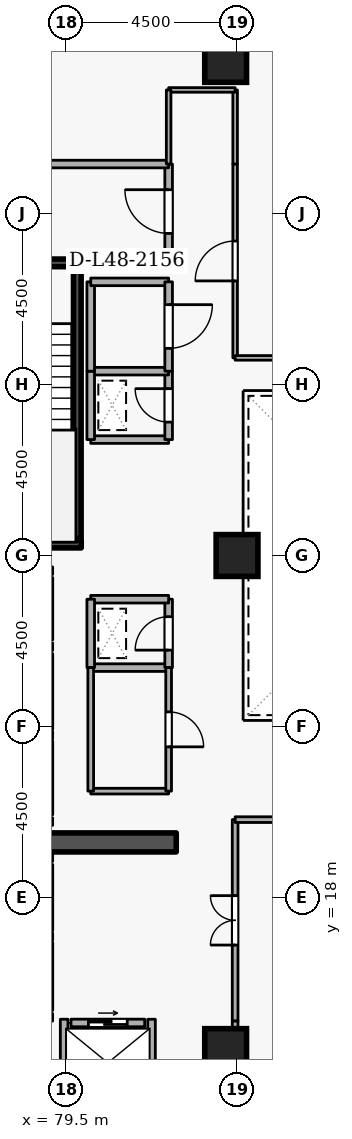
"""IFC4 building model, lengths in metres.
Left out: names, types, materials, properties, quantities, classifications, styles, units other than length and angle.
Written with IfcOpenShell. Run it as: python <this file> out.ifc"""

import sys

from ifc_helpers import new_model, si_unit, direction, frame, frame_2d, origin, origin_2d, place, context, subcontext, project, spatial, rectangle, extrude, element, fill, save


model = new_model("IFC4")
c1 = context("Model", 3, precision=1e-05, world=origin(), true_north=direction((0.0, 1.0)))
c2 = subcontext(c1, "Body", "Model", "MODEL_VIEW")
j1 = project(units=[si_unit("LENGTHUNIT", "METRE"), si_unit("PLANEANGLEUNIT", "RADIAN")], contexts=[c1])
p1 = place(None, origin())
s1 = spatial("IfcSite", under=j1, at=p1, CompositionType="ELEMENT")
p2 = place(p1, origin())
s2 = spatial("IfcBuilding", under=s1, at=p2, CompositionType="ELEMENT")
p3 = place(p2, frame((0.0, 0.0, 182.1)))
s3 = spatial("IfcBuildingStorey", under=s2, at=p3, CompositionType="ELEMENT", Elevation=182.1)
p4 = place(p3, frame((76.6, 19.45, 0.0), z_axis=(0.0, 0.0, 1.0), x_axis=(1.0, 0.0, 0.0)))
e1 = element("IfcWall", 1, at=p4, inside=s3, PredefinedType="SHEAR", context=c2, shape_type="SweptSolid", body=[
    extrude(rectangle(XDim=5.8, YDim=0.5, at=frame_2d((2.9, 0.0))), origin(), (0.0, 0.0, 1.0), 3.6),
])
for number, where, z_axis, x_axis in (
    (2, (83.7, 14.0, 0.0), (0.0, 0.0, 1.0), (1.0, 0.0, 0.0)),
    (3, (83.7, 40.0, 0.0), (0.0, 0.0, 1.0), (1.0, 0.0, 0.0)),
    (4, (84.0, 27.0, 0.0), (0.0, 0.0, 1.0), (1.0, 0.0, 0.0)),
):
    element("IfcColumn", number, at=place(p3, frame(where, z_axis=z_axis, x_axis=x_axis)), inside=s3, PredefinedType="COLUMN", context=c2, shape_type="SweptSolid", body=[
        extrude(rectangle(XDim=1.1, YDim=1.1, at=origin_2d()), origin(), (0.0, 0.0, 1.0), 3.6),
    ])
p5 = place(p3, frame((79.05, 24.78, 0.0), z_axis=(0.0, 0.0, 1.0), x_axis=(0.0, 1.0, 0.0)))
e5 = element("IfcWall", 5, at=p5, inside=s3, PredefinedType="STANDARD", context=c2, shape_type="SweptSolid", body=[
    extrude(rectangle(XDim=1.64, YDim=0.2, at=frame_2d((0.82, 0.0))), origin(), (0.0, 0.0, 1.0), 3.34),
])
p6 = place(p5, frame((0.31, 0.0, 0.0)))
e6 = element("IfcOpeningElement", 6, at=p6, cuts=e5, PredefinedType="OPENING", context=c2, shape_type="SweptSolid", body=[
    extrude(rectangle(XDim=1.02, YDim=2.06, at=frame_2d((0.51, 1.03))), frame((0.0, 0.11, 0.0), z_axis=(0.0, -1.0, 0.0), x_axis=(1.0, 0.0, 0.0)), (0.0, 0.0, 1.0), 0.22),
])
p7 = place(p3, frame((79.05, 22.43, 0.0), z_axis=(0.0, 0.0, 1.0), x_axis=(0.0, 1.0, 0.0)))
e7 = element("IfcWall", 7, at=p7, inside=s3, PredefinedType="STANDARD", context=c2, shape_type="SweptSolid", body=[
    extrude(rectangle(XDim=1.99, YDim=0.2, at=frame_2d((0.995, 0.0))), origin(), (0.0, 0.0, 1.0), 3.34),
])
p8 = place(p7, frame((0.485, 0.0, 0.0)))
e8 = element("IfcOpeningElement", 8, at=p8, cuts=e7, PredefinedType="OPENING", context=c2, shape_type="SweptSolid", body=[
    extrude(rectangle(XDim=1.02, YDim=2.06, at=frame_2d((0.51, 1.03))), frame((0.0, 0.11, 0.0), z_axis=(0.0, -1.0, 0.0), x_axis=(1.0, 0.0, 0.0)), (0.0, 0.0, 1.0), 0.22),
])
p9 = place(p3, frame((79.05, 20.18, 0.0), z_axis=(0.0, 0.0, 1.0), x_axis=(0.0, 1.0, 0.0)))
e9 = element("IfcWall", 9, at=p9, inside=s3, PredefinedType="STANDARD", context=c2, shape_type="SweptSolid", body=[
    extrude(rectangle(XDim=1.94, YDim=0.2, at=frame_2d((0.97, 0.0))), origin(), (0.0, 0.0, 1.0), 3.34),
])
p10 = place(p9, frame((0.46, 0.0, 0.0)))
e10 = element("IfcOpeningElement", 10, at=p10, cuts=e9, PredefinedType="OPENING", context=c2, shape_type="SweptSolid", body=[
    extrude(rectangle(XDim=1.02, YDim=2.06, at=frame_2d((0.51, 1.03))), frame((0.0, 0.11, 0.0), z_axis=(0.0, -1.0, 0.0), x_axis=(1.0, 0.0, 0.0)), (0.0, 0.0, 1.0), 0.22),
])
p11 = place(p3, frame((79.05, 17.13, 0.0), z_axis=(0.0, 0.0, 1.0), x_axis=(0.0, 1.0, 0.0)))
e11 = element("IfcWall", 11, at=p11, inside=s3, PredefinedType="STANDARD", context=c2, shape_type="SweptSolid", body=[
    extrude(rectangle(XDim=1.74, YDim=0.2, at=frame_2d((0.87, 0.0))), origin(), (0.0, 0.0, 1.0), 3.34),
])
p12 = place(p11, frame((0.36, 0.0, 0.0)))
e12 = element("IfcOpeningElement", 12, at=p12, cuts=e11, PredefinedType="OPENING", context=c2, shape_type="SweptSolid", body=[
    extrude(rectangle(XDim=1.02, YDim=2.06, at=frame_2d((0.51, 1.03))), frame((0.0, 0.11, 0.0), z_axis=(0.0, -1.0, 0.0), x_axis=(1.0, 0.0, 0.0)), (0.0, 0.0, 1.0), 0.22),
])
p13 = place(p3, frame((79.05, 15.03, 0.0), z_axis=(0.0, 0.0, 1.0), x_axis=(0.0, 1.0, 0.0)))
e13 = element("IfcWall", 13, at=p13, inside=s3, PredefinedType="STANDARD", context=c2, shape_type="SweptSolid", body=[
    extrude(rectangle(XDim=1.79, YDim=0.2, at=frame_2d((0.895, 0.0))), origin(), (0.0, 0.0, 1.0), 3.34),
])
p14 = place(p13, frame((0.385, 0.0, 0.0)))
e14 = element("IfcOpeningElement", 14, at=p14, cuts=e13, PredefinedType="OPENING", context=c2, shape_type="SweptSolid", body=[
    extrude(rectangle(XDim=1.02, YDim=2.06, at=frame_2d((0.51, 1.03))), frame((0.0, 0.11, 0.0), z_axis=(0.0, -1.0, 0.0), x_axis=(1.0, 0.0, 0.0)), (0.0, 0.0, 1.0), 0.22),
])
p15 = place(p3, frame((79.63, 14.7, 0.0), z_axis=(0.0, 0.0, 1.0), x_axis=(1.0, 0.0, 0.0)))
e15 = element("IfcWall", 15, at=p15, inside=s3, PredefinedType="STANDARD", context=c2, shape_type="SweptSolid", body=[
    extrude(rectangle(XDim=1.94, YDim=0.2, at=frame_2d((0.97, 0.0))), origin(), (0.0, 0.0, 1.0), 3.34),
])
p16 = place(p15, frame((0.46, 0.0, 0.0)))
e16 = element("IfcOpeningElement", 16, at=p16, cuts=e15, PredefinedType="OPENING", context=c2, shape_type="SweptSolid", body=[
    extrude(rectangle(XDim=1.02, YDim=2.06, at=frame_2d((0.51, 1.03))), frame((0.0, 0.11, 0.0), z_axis=(0.0, -1.0, 0.0), x_axis=(1.0, 0.0, 0.0)), (0.0, 0.0, 1.0), 0.22),
])
for number, where, z_axis, x_axis in (
    (17, (81.75, 12.612, 0.0), (0.0, 0.0, 1.0), (0.0, 1.0, 0.0)),
    (18, (79.45, 12.612, 0.0), (0.0, 0.0, 1.0), (0.0, 1.0, 0.0)),
):
    element("IfcWall", number, at=place(p3, frame(where, z_axis=z_axis, x_axis=x_axis)), inside=s3, PredefinedType="STANDARD", context=c2, shape_type="SweptSolid", body=[
        extrude(rectangle(XDim=2.186, YDim=0.2, at=frame_2d((1.093, 0.0))), origin(), (0.0, 0.0, 1.0), 3.34),
    ])
p17 = place(p3, frame((76.55, 34.7, 0.0), z_axis=(0.0, 0.0, 1.0), x_axis=(1.0, 0.0, 0.0)))
e19 = element("IfcWall", 19, at=p17, inside=s3, PredefinedType="SHEAR", context=c2, shape_type="SweptSolid", body=[
    extrude(rectangle(XDim=3.35, YDim=0.2, at=frame_2d((1.675, 0.0))), origin(), (0.0, 0.0, 1.0), 3.6),
])
p18 = place(p17, frame((1.125, 0.0, 0.0)))
e20 = element("IfcOpeningElement", 20, at=p18, cuts=e19, PredefinedType="OPENING", context=c2, shape_type="SweptSolid", body=[
    extrude(rectangle(XDim=1.1, YDim=2.1, at=frame_2d((0.55, 1.05))), frame((0.0, 0.11, 0.0), z_axis=(0.0, -1.0, 0.0), x_axis=(1.0, 0.0, 0.0)), (0.0, 0.0, 1.0), 0.22),
])
p19 = place(p3, frame((79.9, 27.3, 0.0), z_axis=(0.0, 0.0, 1.0), x_axis=(-1.0, 0.0, 0.0)))
e21 = element("IfcWall", 21, at=p19, inside=s3, PredefinedType="SHEAR", context=c2, shape_type="SweptSolid", body=[
    extrude(rectangle(XDim=3.35, YDim=0.2, at=frame_2d((1.675, 0.0))), origin(), (0.0, 0.0, 1.0), 3.6),
])
p20 = place(p3, frame((79.797, 27.45, 0.0), z_axis=(0.0, 0.0, 1.0), x_axis=(0.0, 1.0, 0.0)))
e22 = element("IfcWall", 22, at=p20, inside=s3, PredefinedType="SHEAR", context=c2, shape_type="SweptSolid", body=[
    extrude(rectangle(XDim=7.1, YDim=0.2, at=frame_2d((3.55, 0.0))), origin(), (0.0, 0.0, 1.0), 3.6),
])
p21 = place(p3, frame((79.9, 34.8, 0.0), z_axis=(0.0, 0.0, 1.0), x_axis=(1.0, 0.0, 0.0)))
e23 = element("IfcWall", 23, at=p21, inside=s3, PredefinedType="STANDARD", context=c2, shape_type="SweptSolid", body=[
    extrude(rectangle(XDim=2.3, YDim=0.2, at=frame_2d((1.15, 0.0))), origin(), (0.0, 0.0, 1.0), 2.545),
])
p22 = place(p3, frame((82.2, 34.8, 0.0), z_axis=(0.0, 0.0, 1.0), x_axis=(0.0, 1.0, 0.0)))
e24 = element("IfcWall", 24, at=p22, inside=s3, PredefinedType="STANDARD", context=c2, shape_type="SweptSolid", body=[
    extrude(rectangle(XDim=2.5, YDim=0.2, at=frame_2d((1.25, 0.0))), origin(), (0.0, 0.0, 1.0), 3.34),
])
p23 = place(p22, frame((0.675, 0.0, 0.0)))
e25 = element("IfcOpeningElement", 25, at=p23, cuts=e24, PredefinedType="OPENING", context=c2, shape_type="SweptSolid", body=[
    extrude(rectangle(XDim=1.15, YDim=2.1, at=frame_2d((0.575, 1.05))), frame((0.0, 0.11, 0.0), z_axis=(0.0, -1.0, 0.0), x_axis=(1.0, 0.0, 0.0)), (0.0, 0.0, 1.0), 0.22),
])
p24 = place(p3, frame((82.2, 37.3, 0.0), z_axis=(0.0, 0.0, 1.0), x_axis=(-1.0, 0.0, 0.0)))
e26 = element("IfcWall", 26, at=p24, inside=s3, PredefinedType="STANDARD", context=c2, shape_type="SweptSolid", body=[
    extrude(rectangle(XDim=5.7, YDim=0.2, at=frame_2d((2.85, 0.0))), origin(), (0.0, 0.0, 1.0), 3.34),
])
p25 = place(p3, frame((80.15, 24.05, 0.0), z_axis=(0.0, 0.0, 1.0), x_axis=(1.0, 0.0, 0.0)))
e27 = element("IfcWall", 27, at=p25, inside=s3, PredefinedType="STANDARD", context=c2, shape_type="SweptSolid", body=[
    extrude(rectangle(XDim=2.05, YDim=0.2, at=frame_2d((1.025, 0.0))), origin(), (0.0, 0.0, 1.0), 3.34),
])
p26 = place(p3, frame((82.2, 24.05, 0.0), z_axis=(0.0, 0.0, 1.0), x_axis=(0.0, 1.0, 0.0)))
e28 = element("IfcWall", 28, at=p26, inside=s3, PredefinedType="STANDARD", context=c2, shape_type="SweptSolid", body=[
    extrude(rectangle(XDim=1.8, YDim=0.2, at=frame_2d((0.9, 0.0))), origin(), (0.0, 0.0, 1.0), 3.34),
])
p27 = place(p26, frame((0.46, 0.0, 0.0)))
e29 = element("IfcOpeningElement", 29, at=p27, cuts=e28, PredefinedType="OPENING", context=c2, shape_type="SweptSolid", body=[
    extrude(rectangle(XDim=0.88, YDim=2.04, at=frame_2d((0.44, 1.02))), frame((0.0, 0.11, 0.0), z_axis=(0.0, -1.0, 0.0), x_axis=(1.0, 0.0, 0.0)), (0.0, 0.0, 1.0), 0.22),
])
p28 = place(p3, frame((82.2, 25.85, 0.0), z_axis=(0.0, 0.0, 1.0), x_axis=(-1.0, 0.0, 0.0)))
e30 = element("IfcWall", 30, at=p28, inside=s3, PredefinedType="STANDARD", context=c2, shape_type="SweptSolid", body=[
    extrude(rectangle(XDim=2.05, YDim=0.2, at=frame_2d((1.025, 0.0))), origin(), (0.0, 0.0, 1.0), 3.34),
])
p29 = place(p3, frame((80.15, 25.85, 0.0), z_axis=(0.0, 0.0, 1.0), x_axis=(0.0, -1.0, 0.0)))
e31 = element("IfcWall", 31, at=p29, inside=s3, PredefinedType="STANDARD", context=c2, shape_type="SweptSolid", body=[
    extrude(rectangle(XDim=1.8, YDim=0.2, at=frame_2d((0.9, 0.0))), origin(), (0.0, 0.0, 1.0), 3.34),
])
p30 = place(p3, frame((80.15, 30.05, 0.0), z_axis=(0.0, 0.0, 1.0), x_axis=(1.0, 0.0, 0.0)))
e32 = element("IfcWall", 32, at=p30, inside=s3, PredefinedType="STANDARD", context=c2, shape_type="SweptSolid", body=[
    extrude(rectangle(XDim=2.05, YDim=0.2, at=frame_2d((1.025, 0.0))), origin(), (0.0, 0.0, 1.0), 3.34),
])
p31 = place(p3, frame((82.2, 30.05, 0.0), z_axis=(0.0, 0.0, 1.0), x_axis=(0.0, 1.0, 0.0)))
e33 = element("IfcWall", 33, at=p31, inside=s3, PredefinedType="STANDARD", context=c2, shape_type="SweptSolid", body=[
    extrude(rectangle(XDim=1.8, YDim=0.2, at=frame_2d((0.9, 0.0))), origin(), (0.0, 0.0, 1.0), 3.34),
])
p32 = place(p31, frame((0.46, 0.0, 0.0)))
e34 = element("IfcOpeningElement", 34, at=p32, cuts=e33, PredefinedType="OPENING", context=c2, shape_type="SweptSolid", body=[
    extrude(rectangle(XDim=0.88, YDim=2.04, at=frame_2d((0.44, 1.02))), frame((0.0, 0.11, 0.0), z_axis=(0.0, -1.0, 0.0), x_axis=(1.0, 0.0, 0.0)), (0.0, 0.0, 1.0), 0.22),
])
p33 = place(p3, frame((82.2, 31.85, 0.0), z_axis=(0.0, 0.0, 1.0), x_axis=(-1.0, 0.0, 0.0)))
e35 = element("IfcWall", 35, at=p33, inside=s3, PredefinedType="STANDARD", context=c2, shape_type="SweptSolid", body=[
    extrude(rectangle(XDim=2.05, YDim=0.2, at=frame_2d((1.025, 0.0))), origin(), (0.0, 0.0, 1.0), 3.34),
])
p34 = place(p3, frame((80.15, 31.85, 0.0), z_axis=(0.0, 0.0, 1.0), x_axis=(0.0, -1.0, 0.0)))
e36 = element("IfcWall", 36, at=p34, inside=s3, PredefinedType="STANDARD", context=c2, shape_type="SweptSolid", body=[
    extrude(rectangle(XDim=1.8, YDim=0.2, at=frame_2d((0.9, 0.0))), origin(), (0.0, 0.0, 1.0), 3.34),
])
p35 = place(p3, frame((80.15, 31.85, 0.0), z_axis=(0.0, 0.0, 1.0), x_axis=(0.0, 1.0, 0.0)))
e37 = element("IfcWall", 37, at=p35, inside=s3, PredefinedType="STANDARD", context=c2, shape_type="SweptSolid", body=[
    extrude(rectangle(XDim=2.35, YDim=0.2, at=frame_2d((1.175, 0.0))), origin(), (0.0, 0.0, 1.0), 3.34),
])
p36 = place(p3, frame((80.15, 34.2, 0.0), z_axis=(0.0, 0.0, 1.0), x_axis=(1.0, 0.0, 0.0)))
e38 = element("IfcWall", 38, at=p36, inside=s3, PredefinedType="STANDARD", context=c2, shape_type="SweptSolid", body=[
    extrude(rectangle(XDim=2.05, YDim=0.2, at=frame_2d((1.025, 0.0))), origin(), (0.0, 0.0, 1.0), 2.545),
])
p37 = place(p3, frame((82.2, 34.2, 0.0), z_axis=(0.0, 0.0, 1.0), x_axis=(0.0, -1.0, 0.0)))
e39 = element("IfcWall", 39, at=p37, inside=s3, PredefinedType="STANDARD", context=c2, shape_type="SweptSolid", body=[
    extrude(rectangle(XDim=2.35, YDim=0.2, at=frame_2d((1.175, 0.0))), origin(), (0.0, 0.0, 1.0), 3.34),
])
p38 = place(p37, frame((0.6, 0.0, 0.0)))
e40 = element("IfcOpeningElement", 40, at=p38, cuts=e39, PredefinedType="OPENING", context=c2, shape_type="SweptSolid", body=[
    extrude(rectangle(XDim=1.15, YDim=2.1, at=frame_2d((0.575, 1.05))), frame((0.0, 0.11, 0.0), z_axis=(0.0, -1.0, 0.0), x_axis=(1.0, 0.0, 0.0)), (0.0, 0.0, 1.0), 0.22),
])
p39 = place(p3, frame((82.2, 20.8, 0.0), z_axis=(0.0, 0.0, 1.0), x_axis=(-1.0, 0.0, 0.0)))
e41 = element("IfcWall", 41, at=p39, inside=s3, PredefinedType="PARTITIONING", context=c2, shape_type="SweptSolid", body=[
    extrude(rectangle(XDim=2.05, YDim=0.15, at=frame_2d((1.025, 0.0))), origin(), (0.0, 0.0, 1.0), 3.34),
])
p40 = place(p3, frame((80.15, 20.8, 0.0), z_axis=(0.0, 0.0, 1.0), x_axis=(0.0, 1.0, 0.0)))
e42 = element("IfcWall", 42, at=p40, inside=s3, PredefinedType="PARTITIONING", context=c2, shape_type="SweptSolid", body=[
    extrude(rectangle(XDim=3.25, YDim=0.15, at=frame_2d((1.625, 0.0))), origin(), (0.0, 0.0, 1.0), 3.34),
])
p41 = place(p3, frame((82.2, 24.05, 0.0), z_axis=(0.0, 0.0, 1.0), x_axis=(0.0, -1.0, 0.0)))
e43 = element("IfcWall", 43, at=p41, inside=s3, PredefinedType="PARTITIONING", context=c2, shape_type="SweptSolid", body=[
    extrude(rectangle(XDim=3.25, YDim=0.15, at=frame_2d((1.625, 0.0))), origin(), (0.0, 0.0, 1.0), 3.34),
])
p42 = place(p41, frame((1.165, 0.0, 0.0)))
e44 = element("IfcOpeningElement", 44, at=p42, cuts=e43, PredefinedType="OPENING", context=c2, shape_type="SweptSolid", body=[
    extrude(rectangle(XDim=0.92, YDim=2.08, at=frame_2d((0.46, 1.04))), frame((0.0, 0.085, 0.0), z_axis=(0.0, -1.0, 0.0), x_axis=(1.0, 0.0, 0.0)), (0.0, 0.0, 1.0), 0.17),
])
p43 = place(p3, frame((83.95, 14.75, 0.0), z_axis=(0.0, 0.0, 1.0), x_axis=(0.0, 1.0, 0.0)))
e45 = element("IfcWall", 45, at=p43, inside=s3, PredefinedType="PARTITIONING", context=c2, shape_type="SweptSolid", body=[
    extrude(rectangle(XDim=5.3, YDim=0.15, at=frame_2d((2.65, 0.0))), origin(), (0.0, 0.0, 1.0), 3.34),
])
p44 = place(p43, frame((2.0, 0.0, 0.0)))
e46 = element("IfcOpeningElement", 46, at=p44, cuts=e45, PredefinedType="OPENING", context=c2, shape_type="SweptSolid", body=[
    extrude(rectangle(XDim=1.3, YDim=2.12, at=frame_2d((0.65, 1.06))), frame((0.0, 0.085, 0.0), z_axis=(0.0, -1.0, 0.0), x_axis=(1.0, 0.0, 0.0)), (0.0, 0.0, 1.0), 0.17),
])
p45 = place(p3, frame((83.95, 20.05, 0.0), z_axis=(0.0, 0.0, 1.0), x_axis=(1.0, 0.0, 0.0)))
e47 = element("IfcWall", 47, at=p45, inside=s3, PredefinedType="PARTITIONING", context=c2, shape_type="SweptSolid", body=[
    extrude(rectangle(XDim=4.55, YDim=0.15, at=frame_2d((2.275, 0.0))), origin(), (0.0, 0.0, 1.0), 3.34),
])
p46 = place(p3, frame((83.95, 12.4, 0.0), z_axis=(0.0, 0.0, 1.0), x_axis=(0.0, 1.0, 0.0)))
e48 = element("IfcWall", 48, at=p46, inside=s3, PredefinedType="PARTITIONING", context=c2, shape_type="SweptSolid", body=[
    extrude(rectangle(XDim=2.35, YDim=0.15, at=frame_2d((1.175, 0.0))), origin(), (0.0, 0.0, 1.0), 3.34),
])
p47 = place(p3, frame((83.95, 32.2, 0.0), z_axis=(0.0, 0.0, 1.0), x_axis=(0.0, 1.0, 0.0)))
e49 = element("IfcWall", 49, at=p47, inside=s3, PredefinedType="PARTITIONING", context=c2, shape_type="SweptSolid", body=[
    extrude(rectangle(XDim=5.1, YDim=0.12, at=frame_2d((2.55, 0.0))), origin(), (0.0, 0.0, 1.0), 3.34),
])
p48 = place(p47, frame((2.025, 0.0, 0.0)))
e50 = element("IfcOpeningElement", 50, at=p48, cuts=e49, PredefinedType="OPENING", context=c2, shape_type="SweptSolid", body=[
    extrude(rectangle(XDim=1.05, YDim=2.1, at=frame_2d((0.525, 1.05))), frame((0.0, 0.07, 0.0), z_axis=(0.0, -1.0, 0.0), x_axis=(1.0, 0.0, 0.0)), (0.0, 0.0, 1.0), 0.14),
])
p49 = place(p3, frame((83.95, 37.3, 0.0), z_axis=(0.0, 0.0, 1.0), x_axis=(0.0, 1.0, 0.0)))
e51 = element("IfcWall", 51, at=p49, inside=s3, PredefinedType="PARTITIONING", context=c2, shape_type="SweptSolid", body=[
    extrude(rectangle(XDim=1.95, YDim=0.12, at=frame_2d((0.975, 0.0))), origin(), (0.0, 0.0, 1.0), 3.34),
])
p50 = place(p3, frame((83.95, 39.25, 0.0), z_axis=(0.0, 0.0, 1.0), x_axis=(-1.0, 0.0, 0.0)))
e52 = element("IfcWall", 52, at=p50, inside=s3, PredefinedType="PARTITIONING", context=c2, shape_type="SweptSolid", body=[
    extrude(rectangle(XDim=1.75, YDim=0.12, at=frame_2d((0.875, 0.0))), origin(), (0.0, 0.0, 1.0), 3.34),
])
p51 = place(p3, frame((82.2, 39.25, 0.0), z_axis=(0.0, 0.0, 1.0), x_axis=(0.0, -1.0, 0.0)))
e53 = element("IfcWall", 53, at=p51, inside=s3, PredefinedType="PARTITIONING", context=c2, shape_type="SweptSolid", body=[
    extrude(rectangle(XDim=1.95, YDim=0.12, at=frame_2d((0.975, 0.0))), origin(), (0.0, 0.0, 1.0), 3.34),
])
p52 = place(p3, frame((88.5, 32.2, 0.0), z_axis=(0.0, 0.0, 1.0), x_axis=(-1.0, 0.0, 0.0)))
e54 = element("IfcWall", 54, at=p52, inside=s3, PredefinedType="PARTITIONING", context=c2, shape_type="SweptSolid", body=[
    extrude(rectangle(XDim=4.55, YDim=0.12, at=frame_2d((2.275, 0.0))), origin(), (0.0, 0.0, 1.0), 3.34),
])
p53 = place(p16, origin())
e55 = element("IfcDoor", 55, at=p53, inside=s3, OperationType="SLIDING_TO_LEFT", PredefinedType="DOOR", context=c2, shape_type="SweptSolid", body=[
    extrude(rectangle(XDim=1.02, YDim=2.06, at=frame_2d((0.51, 1.03))), frame((0.0, 0.025, 0.0), z_axis=(0.0, -1.0, 0.0), x_axis=(1.0, 0.0, 0.0)), (0.0, 0.0, 1.0), 0.05),
])
fill(e16, e55)
p54 = place(p23, origin())
e56 = element("IfcDoor", 56, at=p54, inside=s3, OperationType="SINGLE_SWING_RIGHT", PredefinedType="DOOR", context=c2, shape_type="SweptSolid", body=[
    extrude(rectangle(XDim=1.15, YDim=2.1, at=frame_2d((0.575, 1.05))), frame((0.0, 0.025, 0.0), z_axis=(0.0, -1.0, 0.0), x_axis=(1.0, 0.0, 0.0)), (0.0, 0.0, 1.0), 0.05),
])
fill(e25, e56)
p55 = place(p27, origin())
e57 = element("IfcDoor", 57, at=p55, inside=s3, OperationType="SINGLE_SWING_LEFT", PredefinedType="DOOR", context=c2, shape_type="SweptSolid", body=[
    extrude(rectangle(XDim=0.88, YDim=2.04, at=frame_2d((0.44, 1.02))), frame((0.0, 0.025, 0.0), z_axis=(0.0, -1.0, 0.0), x_axis=(1.0, 0.0, 0.0)), (0.0, 0.0, 1.0), 0.05),
])
fill(e29, e57)
p56 = place(p32, origin())
e58 = element("IfcDoor", 58, at=p56, inside=s3, OperationType="SINGLE_SWING_RIGHT", PredefinedType="DOOR", context=c2, shape_type="SweptSolid", body=[
    extrude(rectangle(XDim=0.88, YDim=2.04, at=frame_2d((0.44, 1.02))), frame((0.0, 0.025, 0.0), z_axis=(0.0, -1.0, 0.0), x_axis=(1.0, 0.0, 0.0)), (0.0, 0.0, 1.0), 0.05),
])
fill(e34, e58)
p57 = place(p42, origin())
e59 = element("IfcDoor", 59, at=p57, inside=s3, OperationType="SINGLE_SWING_RIGHT", PredefinedType="DOOR", context=c2, shape_type="SweptSolid", body=[
    extrude(rectangle(XDim=0.92, YDim=2.08, at=frame_2d((0.46, 1.04))), frame((0.0, 0.025, 0.0), z_axis=(0.0, -1.0, 0.0), x_axis=(1.0, 0.0, 0.0)), (0.0, 0.0, 1.0), 0.05),
])
fill(e44, e59)
p58 = place(p38, origin())
e60 = element("IfcDoor", 60, at=p58, inside=s3, OperationType="SINGLE_SWING_LEFT", PredefinedType="DOOR", context=c2, shape_type="SweptSolid", body=[
    extrude(rectangle(XDim=1.15, YDim=2.1, at=frame_2d((0.575, 1.05))), frame((0.0, 0.025, 0.0), z_axis=(0.0, -1.0, 0.0), x_axis=(1.0, 0.0, 0.0)), (0.0, 0.0, 1.0), 0.05),
])
fill(e40, e60)
p59 = place(p44, origin())
e61 = element("IfcDoor", 61, at=p59, inside=s3, OperationType="DOUBLE_DOOR_SINGLE_SWING", PredefinedType="DOOR", context=c2, shape_type="SweptSolid", body=[
    extrude(rectangle(XDim=1.3, YDim=2.12, at=frame_2d((0.65, 1.06))), frame((0.0, 0.025, 0.0), z_axis=(0.0, -1.0, 0.0), x_axis=(1.0, 0.0, 0.0)), (0.0, 0.0, 1.0), 0.05),
])
fill(e46, e61)
p60 = place(p48, origin())
e62 = element("IfcDoor", 62, at=p60, inside=s3, OperationType="SINGLE_SWING_LEFT", PredefinedType="DOOR", context=c2, shape_type="SweptSolid", body=[
    extrude(rectangle(XDim=1.05, YDim=2.1, at=frame_2d((0.525, 1.05))), frame((0.0, 0.025, 0.0), z_axis=(0.0, -1.0, 0.0), x_axis=(1.0, 0.0, 0.0)), (0.0, 0.0, 1.0), 0.05),
])
fill(e50, e62)
save(model, sys.argv[1])
